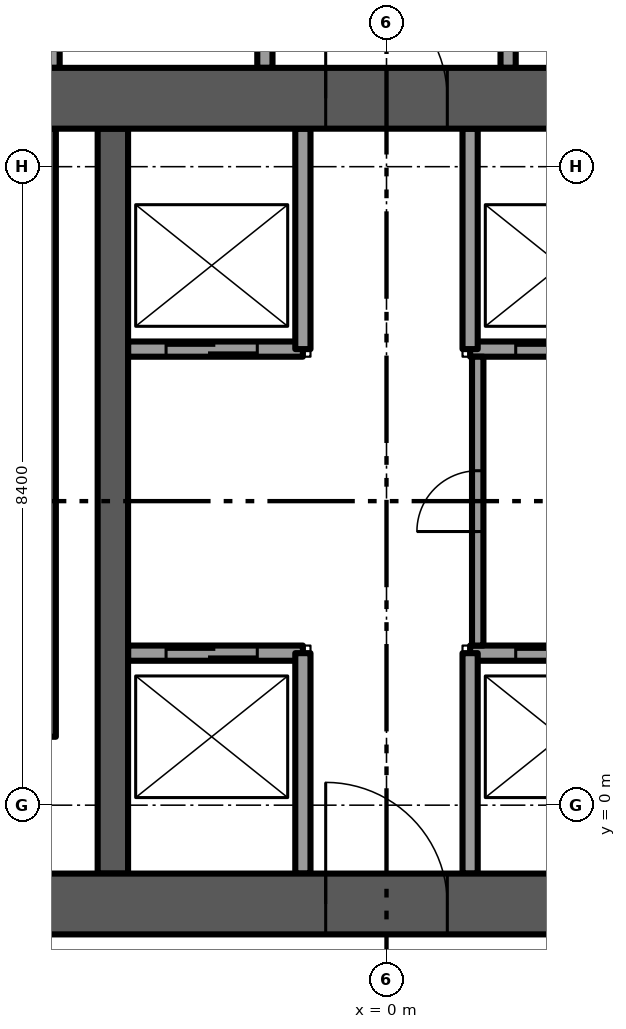
"""IFC4 building model, lengths in metres.
Left out: names, types, materials, properties, quantities, classifications, styles, units other than length and angle.
Written with IfcOpenShell. Run it as: python <this file> out.ifc"""

import sys

from ifc_helpers import new_model, si_unit, direction, frame, frame_2d, origin, place, context, subcontext, project, spatial, rectangle, extrude, element, fill, save


model = new_model("IFC4")
c1 = context("Model", 3, precision=1e-05, world=origin(), true_north=direction((0.0, 1.0)))
c2 = subcontext(c1, "Body", "Model", "MODEL_VIEW")
j1 = project(units=[si_unit("LENGTHUNIT", "METRE"), si_unit("PLANEANGLEUNIT", "RADIAN")], contexts=[c1])
p1 = place(None, origin())
s1 = spatial("IfcSite", under=j1, at=p1, CompositionType="ELEMENT")
p2 = place(p1, origin())
s2 = spatial("IfcBuilding", under=s1, at=p2, CompositionType="ELEMENT")
p3 = place(p2, frame((0.0, 0.0, 151.0)))
s3 = spatial("IfcBuildingStorey", under=s2, at=p3, CompositionType="ELEMENT", Elevation=151.0)
p4 = place(p3, frame((-8.5, -1.3, -0.3), z_axis=(0.0, 0.0, 1.0), x_axis=(1.0, 0.0, 0.0)))
e1 = element("IfcWall", 1, at=p4, inside=s3, PredefinedType="SHEAR", context=c2, shape_type="SweptSolid", body=[
    extrude(rectangle(XDim=17.0, YDim=0.8, at=frame_2d((8.5, 0.0))), origin(), (0.0, 0.0, 1.0), 6.0),
])
p5 = place(p4, frame((7.7, 0.0, 0.0)))
e2 = element("IfcOpeningElement", 2, at=p5, cuts=e1, PredefinedType="OPENING", context=c2, shape_type="SweptSolid", body=[
    extrude(rectangle(XDim=1.6, YDim=2.1, at=frame_2d((0.8, 1.05))), frame((0.0, 0.4, 0.0), z_axis=(0.0, -1.0, 0.0), x_axis=(1.0, 0.0, 0.0)), (0.0, 0.0, 1.0), 0.8),
])
p6 = place(p3, frame((-8.5, 9.3, -0.3), z_axis=(0.0, 0.0, 1.0), x_axis=(1.0, 0.0, 0.0)))
e3 = element("IfcWall", 3, at=p6, inside=s3, PredefinedType="SHEAR", context=c2, shape_type="SweptSolid", body=[
    extrude(rectangle(XDim=17.0, YDim=0.8, at=frame_2d((8.5, 0.0))), origin(), (0.0, 0.0, 1.0), 6.0),
])
p7 = place(p6, frame((7.7, 0.0, 0.0)))
e4 = element("IfcOpeningElement", 4, at=p7, cuts=e3, PredefinedType="OPENING", context=c2, shape_type="SweptSolid", body=[
    extrude(rectangle(XDim=1.6, YDim=2.1, at=frame_2d((0.8, 1.05))), frame((0.0, 0.4, 0.0), z_axis=(0.0, -1.0, 0.0), x_axis=(1.0, 0.0, 0.0)), (0.0, 0.0, 1.0), 0.8),
])
p8 = place(p6, frame((1.75, 0.0, 0.0)))
e5 = element("IfcOpeningElement", 5, at=p8, cuts=e3, PredefinedType="OPENING", context=c2, shape_type="SweptSolid", body=[
    extrude(rectangle(XDim=1.1, YDim=2.1, at=frame_2d((0.55, 1.05))), frame((0.0, 0.4, 0.0), z_axis=(0.0, -1.0, 0.0), x_axis=(1.0, 0.0, 0.0)), (0.0, 0.0, 1.0), 0.8),
])
p9 = place(p6, frame((14.15, 0.0, 0.0)))
e6 = element("IfcOpeningElement", 6, at=p9, cuts=e3, PredefinedType="OPENING", context=c2, shape_type="SweptSolid", body=[
    extrude(rectangle(XDim=1.1, YDim=2.1, at=frame_2d((0.55, 1.05))), frame((0.0, 0.4, 0.0), z_axis=(0.0, -1.0, 0.0), x_axis=(1.0, 0.0, 0.0)), (0.0, 0.0, 1.0), 0.8),
])
p10 = place(p3, frame((-3.6, -0.9, -0.3), z_axis=(0.0, 0.0, 1.0), x_axis=(0.0, 1.0, 0.0)))
e7 = element("IfcWall", 7, at=p10, inside=s3, PredefinedType="SHEAR", context=c2, shape_type="SweptSolid", body=[
    extrude(rectangle(XDim=9.8, YDim=0.4, at=frame_2d((4.9, 0.0))), origin(), (0.0, 0.0, 1.0), 6.0),
])
p11 = place(p3, frame((-3.4, 2.0, 0.0), z_axis=(0.0, 0.0, 1.0), x_axis=(1.0, 0.0, 0.0)))
e8 = element("IfcWall", 8, at=p11, inside=s3, PredefinedType="PARTITIONING", context=c2, shape_type="SweptSolid", body=[
    extrude(rectangle(XDim=2.3, YDim=0.2, at=frame_2d((1.15, 0.0))), origin(), (0.0, 0.0, 1.0), 5.7),
])
p12 = place(p11, frame((0.5, 0.0, 0.0)))
e9 = element("IfcOpeningElement", 9, at=p12, cuts=e8, PredefinedType="OPENING", context=c2, shape_type="SweptSolid", body=[
    extrude(rectangle(XDim=1.2, YDim=2.1, at=frame_2d((0.6, 1.05))), frame((0.0, 0.1, 0.0), z_axis=(0.0, -1.0, 0.0), x_axis=(1.0, 0.0, 0.0)), (0.0, 0.0, 1.0), 0.2),
])
p13 = place(p3, frame((-3.4, 6.0, 0.0), z_axis=(0.0, 0.0, 1.0), x_axis=(1.0, 0.0, 0.0)))
e10 = element("IfcWall", 10, at=p13, inside=s3, PredefinedType="PARTITIONING", context=c2, shape_type="SweptSolid", body=[
    extrude(rectangle(XDim=2.3, YDim=0.2, at=frame_2d((1.15, 0.0))), origin(), (0.0, 0.0, 1.0), 5.7),
])
p14 = place(p13, frame((0.5, 0.0, 0.0)))
e11 = element("IfcOpeningElement", 11, at=p14, cuts=e10, PredefinedType="OPENING", context=c2, shape_type="SweptSolid", body=[
    extrude(rectangle(XDim=1.2, YDim=2.1, at=frame_2d((0.6, 1.05))), frame((0.0, 0.1, 0.0), z_axis=(0.0, -1.0, 0.0), x_axis=(1.0, 0.0, 0.0)), (0.0, 0.0, 1.0), 0.2),
])
p15 = place(p3, frame((1.1, 2.0, 0.0), z_axis=(0.0, 0.0, 1.0), x_axis=(1.0, 0.0, 0.0)))
e12 = element("IfcWall", 12, at=p15, inside=s3, PredefinedType="PARTITIONING", context=c2, shape_type="SweptSolid", body=[
    extrude(rectangle(XDim=2.3, YDim=0.2, at=frame_2d((1.15, 0.0))), origin(), (0.0, 0.0, 1.0), 5.7),
])
p16 = place(p15, frame((0.6, 0.0, 0.0)))
e13 = element("IfcOpeningElement", 13, at=p16, cuts=e12, PredefinedType="OPENING", context=c2, shape_type="SweptSolid", body=[
    extrude(rectangle(XDim=1.2, YDim=2.1, at=frame_2d((0.6, 1.05))), frame((0.0, 0.1, 0.0), z_axis=(0.0, -1.0, 0.0), x_axis=(1.0, 0.0, 0.0)), (0.0, 0.0, 1.0), 0.2),
])
p17 = place(p3, frame((1.1, 6.0, 0.0), z_axis=(0.0, 0.0, 1.0), x_axis=(1.0, 0.0, 0.0)))
e14 = element("IfcWall", 14, at=p17, inside=s3, PredefinedType="PARTITIONING", context=c2, shape_type="SweptSolid", body=[
    extrude(rectangle(XDim=2.3, YDim=0.2, at=frame_2d((1.15, 0.0))), origin(), (0.0, 0.0, 1.0), 5.7),
])
p18 = place(p17, frame((0.6, 0.0, 0.0)))
e15 = element("IfcOpeningElement", 15, at=p18, cuts=e14, PredefinedType="OPENING", context=c2, shape_type="SweptSolid", body=[
    extrude(rectangle(XDim=1.2, YDim=2.1, at=frame_2d((0.6, 1.05))), frame((0.0, 0.1, 0.0), z_axis=(0.0, -1.0, 0.0), x_axis=(1.0, 0.0, 0.0)), (0.0, 0.0, 1.0), 0.2),
])
for number, where, z_axis, x_axis in (
    (16, (-1.1, -0.9, 0.0), (0.0, 0.0, 1.0), (0.0, 1.0, 0.0)),
    (17, (1.1, -0.9, 0.0), (0.0, 0.0, 1.0), (0.0, 1.0, 0.0)),
    (18, (-1.1, 6.0, 0.0), (0.0, 0.0, 1.0), (0.0, 1.0, 0.0)),
    (19, (1.1, 6.0, 0.0), (0.0, 0.0, 1.0), (0.0, 1.0, 0.0)),
):
    element("IfcWall", number, at=place(p3, frame(where, z_axis=z_axis, x_axis=x_axis)), inside=s3, PredefinedType="PARTITIONING", context=c2, shape_type="SweptSolid", body=[
        extrude(rectangle(XDim=2.9, YDim=0.2, at=frame_2d((1.45, 0.0))), origin(), (0.0, 0.0, 1.0), 5.7),
    ])
p19 = place(p3, frame((-4.45, 0.9, -0.3), z_axis=(0.0, 0.0, 1.0), x_axis=(0.0, 1.0, 0.0)))
e20 = element("IfcWall", 20, at=p19, inside=s3, PredefinedType="SOLIDWALL", context=c2, shape_type="SweptSolid", body=[
    extrude(rectangle(XDim=8.0, YDim=0.2, at=frame_2d((4.0, 0.0))), origin(), (0.0, 0.0, 1.0), 6.0),
])
p20 = place(p3, frame((-4.4, 9.7, 0.0), z_axis=(0.0, 0.0, 1.0), x_axis=(0.0, 1.0, 0.0)))
e21 = element("IfcWall", 21, at=p20, inside=s3, PredefinedType="PARTITIONING", context=c2, shape_type="SweptSolid", body=[
    extrude(rectangle(XDim=3.9, YDim=0.2, at=frame_2d((1.95, 0.0))), origin(), (0.0, 0.0, 1.0), 5.7),
])
p21 = place(p20, frame((1.35, 0.0, 0.0)))
e22 = element("IfcOpeningElement", 22, at=p21, cuts=e21, PredefinedType="OPENING", context=c2, shape_type="SweptSolid", body=[
    extrude(rectangle(XDim=1.2, YDim=2.1, at=frame_2d((0.6, 1.05))), frame((0.0, 0.1, 0.0), z_axis=(0.0, -1.0, 0.0), x_axis=(1.0, 0.0, 0.0)), (0.0, 0.0, 1.0), 0.2),
])
for number, where, z_axis, x_axis in (
    (23, (-1.6, 9.7, 0.0), (0.0, 0.0, 1.0), (0.0, 1.0, 0.0)),
    (24, (1.6, 9.7, 0.0), (0.0, 0.0, 1.0), (0.0, 1.0, 0.0)),
):
    element("IfcWall", number, at=place(p3, frame(where, z_axis=z_axis, x_axis=x_axis)), inside=s3, PredefinedType="PARTITIONING", context=c2, shape_type="SweptSolid", body=[
        extrude(rectangle(XDim=3.9, YDim=0.2, at=frame_2d((1.95, 0.0))), origin(), (0.0, 0.0, 1.0), 5.7),
    ])
p22 = place(p3, frame((1.2, 2.1, 0.0), z_axis=(0.0, 0.0, 1.0), x_axis=(0.0, 1.0, 0.0)))
e25 = element("IfcWall", 25, at=p22, inside=s3, PredefinedType="PARTITIONING", context=c2, shape_type="SweptSolid", body=[
    extrude(rectangle(XDim=3.8, YDim=0.15, at=frame_2d((1.9, 0.0))), origin(), (0.0, 0.0, 1.0), 5.7),
])
p23 = place(p22, frame((1.5, 0.0, 0.0)))
e26 = element("IfcOpeningElement", 26, at=p23, cuts=e25, PredefinedType="OPENING", context=c2, shape_type="SweptSolid", body=[
    extrude(rectangle(XDim=0.8, YDim=2.1, at=frame_2d((0.4, 1.05))), frame((0.0, 0.075, 0.0), z_axis=(0.0, -1.0, 0.0), x_axis=(1.0, 0.0, 0.0)), (0.0, 0.0, 1.0), 0.15),
])
p24 = place(p12, origin())
e27 = element("IfcDoor", 27, at=p24, inside=s3, OperationType="SLIDING_TO_LEFT", PredefinedType="DOOR", context=c2, shape_type="SweptSolid", body=[
    extrude(rectangle(XDim=1.2, YDim=2.1, at=frame_2d((0.6, 1.05))), frame((0.0, 0.025, 0.0), z_axis=(0.0, -1.0, 0.0), x_axis=(1.0, 0.0, 0.0)), (0.0, 0.0, 1.0), 0.05),
])
fill(e9, e27)
p25 = place(p16, origin())
e28 = element("IfcDoor", 28, at=p25, inside=s3, OperationType="SLIDING_TO_LEFT", PredefinedType="DOOR", context=c2, shape_type="SweptSolid", body=[
    extrude(rectangle(XDim=1.2, YDim=2.1, at=frame_2d((0.6, 1.05))), frame((0.0, 0.025, 0.0), z_axis=(0.0, -1.0, 0.0), x_axis=(1.0, 0.0, 0.0)), (0.0, 0.0, 1.0), 0.05),
])
fill(e13, e28)
p26 = place(p14, origin())
e29 = element("IfcDoor", 29, at=p26, inside=s3, OperationType="SLIDING_TO_LEFT", PredefinedType="DOOR", context=c2, shape_type="SweptSolid", body=[
    extrude(rectangle(XDim=1.2, YDim=2.1, at=frame_2d((0.6, 1.05))), frame((0.0, 0.025, 0.0), z_axis=(0.0, -1.0, 0.0), x_axis=(1.0, 0.0, 0.0)), (0.0, 0.0, 1.0), 0.05),
])
fill(e11, e29)
p27 = place(p18, origin())
e30 = element("IfcDoor", 30, at=p27, inside=s3, OperationType="SLIDING_TO_LEFT", PredefinedType="DOOR", context=c2, shape_type="SweptSolid", body=[
    extrude(rectangle(XDim=1.2, YDim=2.1, at=frame_2d((0.6, 1.05))), frame((0.0, 0.025, 0.0), z_axis=(0.0, -1.0, 0.0), x_axis=(1.0, 0.0, 0.0)), (0.0, 0.0, 1.0), 0.05),
])
fill(e15, e30)
p28 = place(p5, origin())
e31 = element("IfcDoor", 31, at=p28, inside=s3, OperationType="DOUBLE_DOOR_SINGLE_SWING", PredefinedType="DOOR", context=c2, shape_type="SweptSolid", body=[
    extrude(rectangle(XDim=1.6, YDim=2.1, at=frame_2d((0.8, 1.05))), frame((0.0, 0.025, 0.0), z_axis=(0.0, -1.0, 0.0), x_axis=(1.0, 0.0, 0.0)), (0.0, 0.0, 1.0), 0.05),
])
fill(e2, e31)
p29 = place(p7, origin())
e32 = element("IfcDoor", 32, at=p29, inside=s3, OperationType="DOUBLE_DOOR_SINGLE_SWING", PredefinedType="DOOR", context=c2, shape_type="SweptSolid", body=[
    extrude(rectangle(XDim=1.6, YDim=2.1, at=frame_2d((0.8, 1.05))), frame((0.0, 0.025, 0.0), z_axis=(0.0, -1.0, 0.0), x_axis=(1.0, 0.0, 0.0)), (0.0, 0.0, 1.0), 0.05),
])
fill(e4, e32)
p30 = place(p23, origin())
e33 = element("IfcDoor", 33, at=p30, inside=s3, OperationType="SINGLE_SWING_RIGHT", PredefinedType="DOOR", context=c2, shape_type="SweptSolid", body=[
    extrude(rectangle(XDim=0.8, YDim=2.1, at=frame_2d((0.4, 1.05))), frame((0.0, 0.025, 0.0), z_axis=(0.0, -1.0, 0.0), x_axis=(1.0, 0.0, 0.0)), (0.0, 0.0, 1.0), 0.05),
])
fill(e26, e33)
save(model, sys.argv[1])
